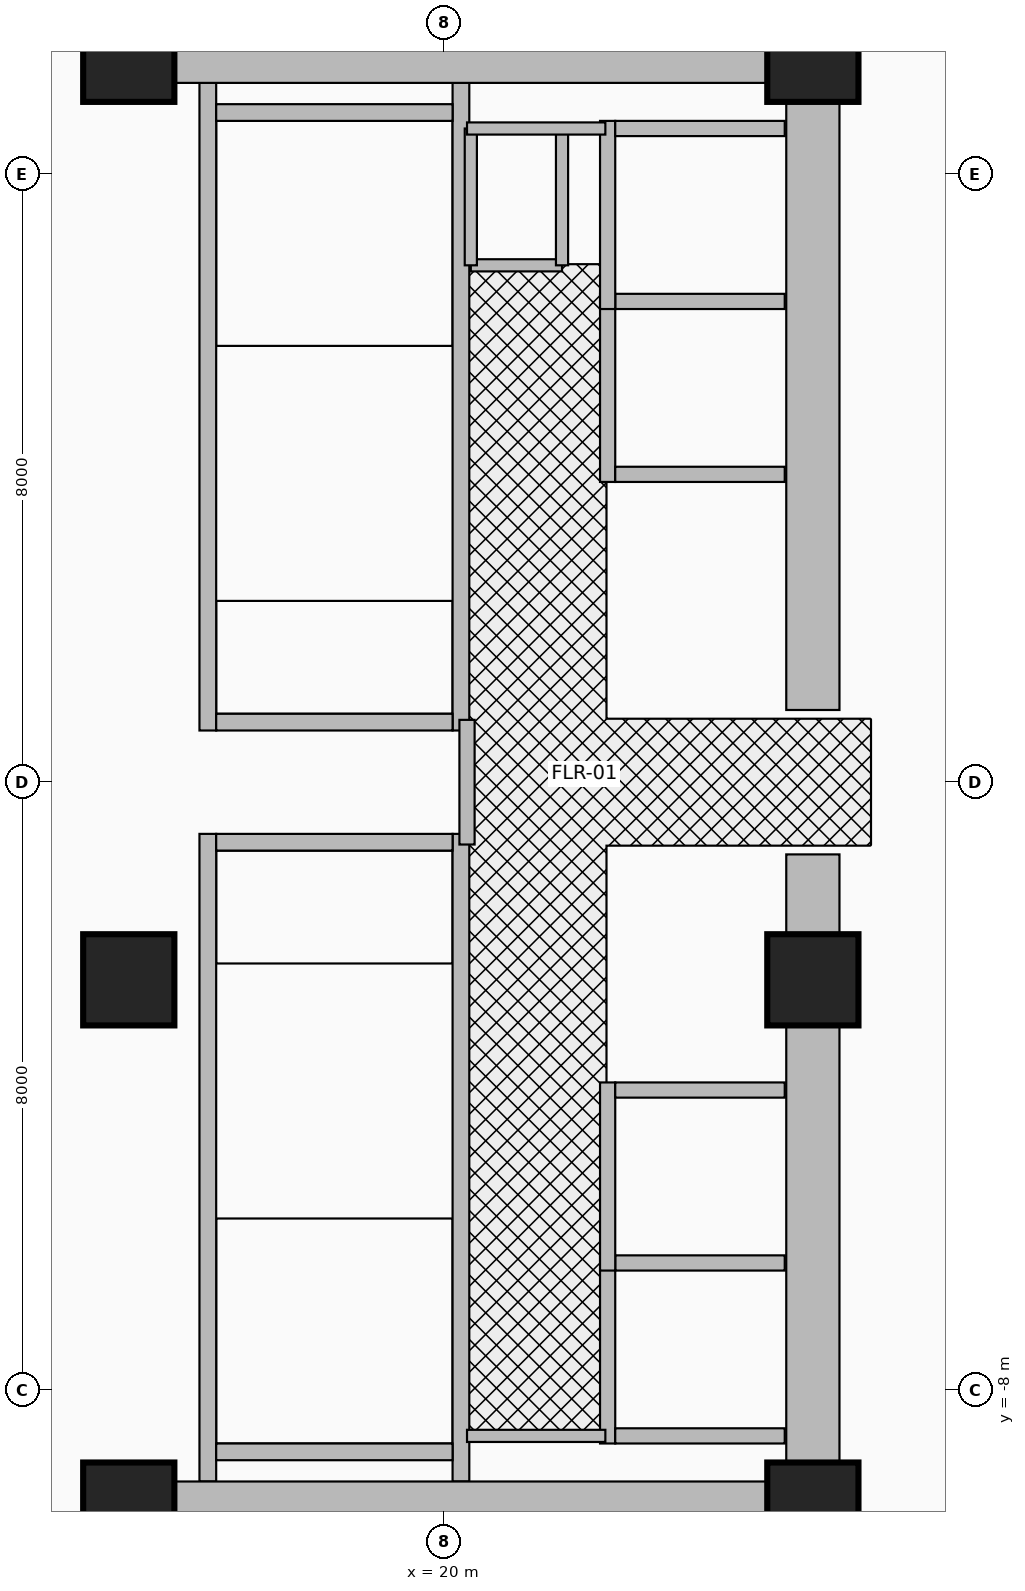
"""IFC4 building model, lengths in metres.
Left out: names, types, materials, properties, quantities, classifications, styles, units other than length and angle.
Written with IfcOpenShell. Run it as: python <this file> out.ifc"""

import sys

from ifc_helpers import new_model, si_unit, direction, frame, frame_2d, origin, origin_2d, place, context, subcontext, project, spatial, rectangle, extrude, source, transform, mapped, element, fill, save


model = new_model("IFC4")
c1 = context("Model", 3, precision=1e-05, world=origin(), true_north=direction((0.0, 1.0)))
c2 = subcontext(c1, "Body", "Model", "MODEL_VIEW")
j1 = project(units=[si_unit("LENGTHUNIT", "METRE"), si_unit("PLANEANGLEUNIT", "RADIAN")], contexts=[c1])
p1 = place(None, origin())
s1 = spatial("IfcSite", under=j1, at=p1, CompositionType="ELEMENT")
p2 = place(p1, origin())
s2 = spatial("IfcBuilding", under=s1, at=p2, CompositionType="ELEMENT")
p3 = place(p2, frame((0.0, 0.0, 101.1)))
s3 = spatial("IfcBuildingStorey", under=s2, at=p3, CompositionType="ELEMENT", Elevation=101.1)
for number, where, z_axis, x_axis in (
    (1, (16.89, 0.68, 0.0), (0.0, 0.0, 1.0), (0.0, 1.0, 0.0)),
    (2, (20.22, 0.68, 0.0), (0.0, 0.0, 1.0), (0.0, 1.0, 0.0)),
):
    element("IfcWall", number, at=place(p3, frame(where, z_axis=z_axis, x_axis=x_axis)), inside=s3, PredefinedType="SHEAR", context=c2, shape_type="SweptSolid", body=[
        extrude(rectangle(XDim=8.52, YDim=0.22, at=frame_2d((4.26, 0.0))), origin(), (0.0, 0.0, 1.0), 4.36),
    ])
p4 = place(p3, frame((17.0, 0.79, 0.0), z_axis=(0.0, 0.0, 1.0), x_axis=(1.0, 0.0, 0.0)))
e3 = element("IfcWall", 3, at=p4, inside=s3, PredefinedType="SHEAR", context=c2, shape_type="SweptSolid", body=[
    extrude(rectangle(XDim=3.11, YDim=0.22, at=frame_2d((1.555, 0.0))), origin(), (0.0, 0.0, 1.0), 4.36),
])
p5 = place(p4, frame((0.95, 0.0, 0.0)))
e4 = element("IfcOpeningElement", 4, at=p5, cuts=e3, PredefinedType="OPENING", context=c2, shape_type="SweptSolid", body=[
    extrude(rectangle(XDim=1.1, YDim=2.15, at=frame_2d((0.55, 1.075))), frame((0.0, 0.125, 0.0), z_axis=(0.0, -1.0, 0.0), x_axis=(1.0, 0.0, 0.0)), (0.0, 0.0, 1.0), 0.25),
])
p6 = place(p3, frame((17.0, 8.81, 0.0), z_axis=(0.0, 0.0, 1.0), x_axis=(1.0, 0.0, 0.0)))
e5 = element("IfcWall", 5, at=p6, inside=s3, PredefinedType="SHEAR", context=c2, shape_type="SweptSolid", body=[
    extrude(rectangle(XDim=3.11, YDim=0.22, at=frame_2d((1.555, 0.0))), origin(), (0.0, 0.0, 1.0), 4.36),
])
for number, where, z_axis, x_axis in (
    (6, (16.89, -9.2, 0.0), (0.0, 0.0, 1.0), (0.0, 1.0, 0.0)),
    (7, (20.22, -9.2, 0.0), (0.0, 0.0, 1.0), (0.0, 1.0, 0.0)),
):
    element("IfcWall", number, at=place(p3, frame(where, z_axis=z_axis, x_axis=x_axis)), inside=s3, PredefinedType="SHEAR", context=c2, shape_type="SweptSolid", body=[
        extrude(rectangle(XDim=8.52, YDim=0.22, at=frame_2d((4.26, 0.0))), origin(), (0.0, 0.0, 1.0), 4.36),
    ])
p7 = place(p3, frame((17.0, -8.81, 0.0), z_axis=(0.0, 0.0, 1.0), x_axis=(1.0, 0.0, 0.0)))
e8 = element("IfcWall", 8, at=p7, inside=s3, PredefinedType="SHEAR", context=c2, shape_type="SweptSolid", body=[
    extrude(rectangle(XDim=3.11, YDim=0.22, at=frame_2d((1.555, 0.0))), origin(), (0.0, 0.0, 1.0), 4.36),
])
p8 = place(p3, frame((17.0, -0.79, 0.0), z_axis=(0.0, 0.0, 1.0), x_axis=(1.0, 0.0, 0.0)))
e9 = element("IfcWall", 9, at=p8, inside=s3, PredefinedType="SHEAR", context=c2, shape_type="SweptSolid", body=[
    extrude(rectangle(XDim=3.11, YDim=0.22, at=frame_2d((1.555, 0.0))), origin(), (0.0, 0.0, 1.0), 4.36),
])
p9 = place(p8, frame((0.95, 0.0, 0.0)))
e10 = element("IfcOpeningElement", 10, at=p9, cuts=e9, PredefinedType="OPENING", context=c2, shape_type="SweptSolid", body=[
    extrude(rectangle(XDim=1.1, YDim=2.15, at=frame_2d((0.55, 1.075))), frame((0.0, 0.125, 0.0), z_axis=(0.0, -1.0, 0.0), x_axis=(1.0, 0.0, 0.0)), (0.0, 0.0, 1.0), 0.25),
])
for number, where, z_axis, x_axis in (
    (11, (24.85, -9.9, 0.0), (0.0, 0.0, 1.0), (0.0, 1.0, 0.0)),
    (12, (24.85, 0.95, 0.0), (0.0, 0.0, 1.0), (0.0, 1.0, 0.0)),
):
    element("IfcWall", number, at=place(p3, frame(where, z_axis=z_axis, x_axis=x_axis)), inside=s3, PredefinedType="SHEAR", context=c2, shape_type="SweptSolid", body=[
        extrude(rectangle(XDim=8.95, YDim=0.7, at=frame_2d((4.475, 0.0))), origin(), (0.0, 0.0, 1.0), 4.36),
    ])
for number, where, z_axis, x_axis in (
    (13, (15.85, 9.55, 0.0), (0.0, 0.0, 1.0), (1.0, 0.0, 0.0)),
    (14, (15.85, -9.55, 0.0), (0.0, 0.0, 1.0), (1.0, 0.0, 0.0)),
):
    element("IfcWall", number, at=place(p3, frame(where, z_axis=z_axis, x_axis=x_axis)), inside=s3, PredefinedType="SHEAR", context=c2, shape_type="SweptSolid", body=[
        extrude(rectangle(XDim=9.0, YDim=0.7, at=frame_2d((4.5, 0.0))), origin(), (0.0, 0.0, 1.0), 4.36),
    ])
m1 = source(origin(), c2, "Body", "SweptSolid", [
    extrude(rectangle(XDim=1.2, YDim=1.2, at=origin_2d()), origin(), (0.0, 0.0, 1.0), 4.6),
])
for number, where, z_axis, x_axis in (
    (15, (15.85, -9.55, 0.0), (0.0, 0.0, 1.0), (1.0, 0.0, 0.0)),
    (16, (24.85, -9.55, 0.0), (0.0, 0.0, 1.0), (1.0, 0.0, 0.0)),
    (17, (15.85, -2.6, 0.0), (0.0, 0.0, 1.0), (1.0, 0.0, 0.0)),
    (18, (24.85, -2.6, 0.0), (0.0, 0.0, 1.0), (1.0, 0.0, 0.0)),
    (19, (15.85, 9.55, 0.0), (0.0, 0.0, 1.0), (1.0, 0.0, 0.0)),
    (20, (24.85, 9.55, 0.0), (0.0, 0.0, 1.0), (1.0, 0.0, 0.0)),
):
    element("IfcColumn", number, at=place(p3, frame(where, z_axis=z_axis, x_axis=x_axis)), inside=s3, PredefinedType="COLUMN", context=c2, shape_type="MappedRepresentation", body=[
        mapped(m1, transform((0.0, 0.0, 0.0), x_axis=(1.0, 0.0, 0.0), y_axis=(0.0, 1.0, 0.0), z_axis=(0.0, 0.0, 1.0), scale=1.0)),
    ])
p10 = place(p3, frame((22.15, -8.7, 0.0), z_axis=(0.0, 0.0, 1.0), x_axis=(0.0, 1.0, 0.0)))
e21 = element("IfcWall", 21, at=p10, inside=s3, PredefinedType="MOVABLE", context=c2, shape_type="SweptSolid", body=[
    extrude(rectangle(XDim=2.475, YDim=0.2, at=frame_2d((1.237, 0.0))), origin(), (0.0, 0.0, 1.0), 4.36),
])
p11 = place(p10, frame((0.688, 0.0, 0.0)))
e22 = element("IfcOpeningElement", 22, at=p11, cuts=e21, PredefinedType="OPENING", context=c2, shape_type="SweptSolid", body=[
    extrude(rectangle(XDim=1.1, YDim=2.1, at=frame_2d((0.55, 1.05))), frame((0.0, 0.115, 0.0), z_axis=(0.0, -1.0, 0.0), x_axis=(1.0, 0.0, 0.0)), (0.0, 0.0, 1.0), 0.23),
])
for number, where, z_axis, x_axis in (
    (23, (22.25, -8.6, 0.0), (0.0, 0.0, 1.0), (1.0, 0.0, 0.0)),
    (24, (22.25, -6.325, 0.0), (0.0, 0.0, 1.0), (1.0, 0.0, 0.0)),
):
    element("IfcWall", number, at=place(p3, frame(where, z_axis=z_axis, x_axis=x_axis)), inside=s3, PredefinedType="MOVABLE", context=c2, shape_type="SweptSolid", body=[
        extrude(rectangle(XDim=2.23, YDim=0.2, at=frame_2d((1.115, 0.0))), origin(), (0.0, 0.0, 1.0), 4.36),
    ])
p12 = place(p3, frame((22.15, -6.425, 0.0), z_axis=(0.0, 0.0, 1.0), x_axis=(0.0, 1.0, 0.0)))
e25 = element("IfcWall", 25, at=p12, inside=s3, PredefinedType="MOVABLE", context=c2, shape_type="SweptSolid", body=[
    extrude(rectangle(XDim=2.475, YDim=0.2, at=frame_2d((1.238, 0.0))), origin(), (0.0, 0.0, 1.0), 4.36),
])
p13 = place(p12, frame((0.688, 0.0, 0.0)))
e26 = element("IfcOpeningElement", 26, at=p13, cuts=e25, PredefinedType="OPENING", context=c2, shape_type="SweptSolid", body=[
    extrude(rectangle(XDim=1.1, YDim=2.1, at=frame_2d((0.55, 1.05))), frame((0.0, 0.115, 0.0), z_axis=(0.0, -1.0, 0.0), x_axis=(1.0, 0.0, 0.0)), (0.0, 0.0, 1.0), 0.23),
])
p14 = place(p3, frame((22.25, -4.05, 0.0), z_axis=(0.0, 0.0, 1.0), x_axis=(1.0, 0.0, 0.0)))
e27 = element("IfcWall", 27, at=p14, inside=s3, PredefinedType="MOVABLE", context=c2, shape_type="SweptSolid", body=[
    extrude(rectangle(XDim=2.23, YDim=0.2, at=frame_2d((1.115, 0.0))), origin(), (0.0, 0.0, 1.0), 4.36),
])
p15 = place(p3, frame((22.15, 3.95, 0.0), z_axis=(0.0, 0.0, 1.0), x_axis=(0.0, 1.0, 0.0)))
e28 = element("IfcWall", 28, at=p15, inside=s3, PredefinedType="MOVABLE", context=c2, shape_type="SweptSolid", body=[
    extrude(rectangle(XDim=2.475, YDim=0.2, at=frame_2d((1.238, 0.0))), origin(), (0.0, 0.0, 1.0), 4.36),
])
p16 = place(p15, frame((0.688, 0.0, 0.0)))
e29 = element("IfcOpeningElement", 29, at=p16, cuts=e28, PredefinedType="OPENING", context=c2, shape_type="SweptSolid", body=[
    extrude(rectangle(XDim=1.1, YDim=2.1, at=frame_2d((0.55, 1.05))), frame((0.0, 0.115, 0.0), z_axis=(0.0, -1.0, 0.0), x_axis=(1.0, 0.0, 0.0)), (0.0, 0.0, 1.0), 0.23),
])
for number, where, z_axis, x_axis in (
    (30, (22.25, 4.05, 0.0), (0.0, 0.0, 1.0), (1.0, 0.0, 0.0)),
    (31, (22.25, 6.325, 0.0), (0.0, 0.0, 1.0), (1.0, 0.0, 0.0)),
):
    element("IfcWall", number, at=place(p3, frame(where, z_axis=z_axis, x_axis=x_axis)), inside=s3, PredefinedType="MOVABLE", context=c2, shape_type="SweptSolid", body=[
        extrude(rectangle(XDim=2.23, YDim=0.2, at=frame_2d((1.115, 0.0))), origin(), (0.0, 0.0, 1.0), 3.145),
    ])
p17 = place(p3, frame((22.15, 6.225, 0.0), z_axis=(0.0, 0.0, 1.0), x_axis=(0.0, 1.0, 0.0)))
e32 = element("IfcWall", 32, at=p17, inside=s3, PredefinedType="MOVABLE", context=c2, shape_type="SweptSolid", body=[
    extrude(rectangle(XDim=2.475, YDim=0.2, at=frame_2d((1.237, 0.0))), origin(), (0.0, 0.0, 1.0), 4.36),
])
p18 = place(p17, frame((0.688, 0.0, 0.0)))
e33 = element("IfcOpeningElement", 33, at=p18, cuts=e32, PredefinedType="OPENING", context=c2, shape_type="SweptSolid", body=[
    extrude(rectangle(XDim=1.1, YDim=2.1, at=frame_2d((0.55, 1.05))), frame((0.0, 0.115, 0.0), z_axis=(0.0, -1.0, 0.0), x_axis=(1.0, 0.0, 0.0)), (0.0, 0.0, 1.0), 0.23),
])
p19 = place(p3, frame((22.25, 8.6, 0.0), z_axis=(0.0, 0.0, 1.0), x_axis=(1.0, 0.0, 0.0)))
e34 = element("IfcWall", 34, at=p19, inside=s3, PredefinedType="MOVABLE", context=c2, shape_type="SweptSolid", body=[
    extrude(rectangle(XDim=2.23, YDim=0.2, at=frame_2d((1.115, 0.0))), origin(), (0.0, 0.0, 1.0), 3.145),
])
p20 = place(p3, frame((20.3, -0.82, 0.0), z_axis=(0.0, 0.0, 1.0), x_axis=(0.0, 1.0, 0.0)))
e35 = element("IfcWall", 35, at=p20, inside=s3, PredefinedType="PARTITIONING", context=c2, shape_type="SweptSolid", body=[
    extrude(rectangle(XDim=1.64, YDim=0.2, at=frame_2d((0.82, 0.0))), origin(), (0.0, 0.0, 1.0), 4.36),
])
p21 = place(p20, frame((0.295, 0.0, 0.0)))
e36 = element("IfcOpeningElement", 36, at=p21, cuts=e35, PredefinedType="OPENING", context=c2, shape_type="SweptSolid", body=[
    extrude(rectangle(XDim=1.05, YDim=2.15, at=frame_2d((0.525, 1.075))), frame((0.0, 0.115, 0.0), z_axis=(0.0, -1.0, 0.0), x_axis=(1.0, 0.0, 0.0)), (0.0, 0.0, 1.0), 0.23),
])
p22 = place(p3, frame((20.35, 6.8, 0.0), z_axis=(0.0, 0.0, 1.0), x_axis=(1.0, 0.0, 0.0)))
e37 = element("IfcWall", 37, at=p22, inside=s3, PredefinedType="PARTITIONING", context=c2, shape_type="SweptSolid", body=[
    extrude(rectangle(XDim=1.2, YDim=0.16, at=frame_2d((0.6, 0.0))), origin(), (0.0, 0.0, 1.0), 4.36),
])
p23 = place(p22, frame((0.175, 0.0, 0.0)))
e38 = element("IfcOpeningElement", 38, at=p23, cuts=e37, PredefinedType="OPENING", context=c2, shape_type="SweptSolid", body=[
    extrude(rectangle(XDim=0.85, YDim=2.05, at=frame_2d((0.425, 1.025))), frame((0.0, 0.095, 0.0), z_axis=(0.0, -1.0, 0.0), x_axis=(1.0, 0.0, 0.0)), (0.0, 0.0, 1.0), 0.19),
])
for number, where, z_axis, x_axis in (
    (39, (21.55, 6.8, 0.0), (0.0, 0.0, 1.0), (0.0, 1.0, 0.0)),
    (40, (20.35, 6.8, 0.0), (0.0, 0.0, 1.0), (0.0, 1.0, 0.0)),
):
    element("IfcWall", number, at=place(p3, frame(where, z_axis=z_axis, x_axis=x_axis)), inside=s3, PredefinedType="PARTITIONING", context=c2, shape_type="SweptSolid", body=[
        extrude(rectangle(XDim=1.8, YDim=0.16, at=frame_2d((0.9, 0.0))), origin(), (0.0, 0.0, 1.0), 4.36),
    ])
for number, where, z_axis, x_axis in (
    (41, (20.3, -8.6, 0.0), (0.0, 0.0, 1.0), (1.0, 0.0, 0.0)),
    (42, (20.3, 8.6, 0.0), (0.0, 0.0, 1.0), (1.0, 0.0, 0.0)),
):
    element("IfcWall", number, at=place(p3, frame(where, z_axis=z_axis, x_axis=x_axis)), inside=s3, PredefinedType="PARTITIONING", context=c2, shape_type="SweptSolid", body=[
        extrude(rectangle(XDim=1.82, YDim=0.16, at=frame_2d((0.91, 0.0))), origin(), (0.0, 0.0, 1.0), 4.36),
    ])
p24 = place(p11, origin())
e43 = element("IfcDoor", 43, at=p24, inside=s3, OperationType="DOUBLE_DOOR_SLIDING", PredefinedType="DOOR", context=c2, shape_type="SweptSolid", body=[
    extrude(rectangle(XDim=1.1, YDim=2.1, at=frame_2d((0.55, 1.05))), frame((0.0, 0.025, 0.0), z_axis=(0.0, -1.0, 0.0), x_axis=(1.0, 0.0, 0.0)), (0.0, 0.0, 1.0), 0.05),
])
fill(e22, e43)
p25 = place(p13, origin())
e44 = element("IfcDoor", 44, at=p25, inside=s3, OperationType="DOUBLE_DOOR_SLIDING", PredefinedType="DOOR", context=c2, shape_type="SweptSolid", body=[
    extrude(rectangle(XDim=1.1, YDim=2.1, at=frame_2d((0.55, 1.05))), frame((0.0, 0.025, 0.0), z_axis=(0.0, -1.0, 0.0), x_axis=(1.0, 0.0, 0.0)), (0.0, 0.0, 1.0), 0.05),
])
fill(e26, e44)
p26 = place(p16, origin())
e45 = element("IfcDoor", 45, at=p26, inside=s3, OperationType="DOUBLE_DOOR_SLIDING", PredefinedType="DOOR", context=c2, shape_type="SweptSolid", body=[
    extrude(rectangle(XDim=1.1, YDim=2.1, at=frame_2d((0.55, 1.05))), frame((0.0, 0.025, 0.0), z_axis=(0.0, -1.0, 0.0), x_axis=(1.0, 0.0, 0.0)), (0.0, 0.0, 1.0), 0.05),
])
fill(e29, e45)
p27 = place(p18, origin())
e46 = element("IfcDoor", 46, at=p27, inside=s3, OperationType="DOUBLE_DOOR_SLIDING", PredefinedType="DOOR", context=c2, shape_type="SweptSolid", body=[
    extrude(rectangle(XDim=1.1, YDim=2.1, at=frame_2d((0.55, 1.05))), frame((0.0, 0.025, 0.0), z_axis=(0.0, -1.0, 0.0), x_axis=(1.0, 0.0, 0.0)), (0.0, 0.0, 1.0), 0.05),
])
fill(e33, e46)
p28 = place(p21, origin())
e47 = element("IfcDoor", 47, at=p28, inside=s3, OperationType="SINGLE_SWING_RIGHT", PredefinedType="DOOR", context=c2, shape_type="SweptSolid", body=[
    extrude(rectangle(XDim=1.05, YDim=2.15, at=frame_2d((0.525, 1.075))), frame((0.0, 0.025, 0.0), z_axis=(0.0, -1.0, 0.0), x_axis=(1.0, 0.0, 0.0)), (0.0, 0.0, 1.0), 0.05),
])
fill(e36, e47)
p29 = place(p5, frame((1.1, 0.0, 0.0), z_axis=(0.0, 0.0, 1.0), x_axis=(-1.0, 0.0, 0.0)))
e48 = element("IfcDoor", 48, at=p29, inside=s3, OperationType="SINGLE_SWING_LEFT", PredefinedType="DOOR", context=c2, shape_type="SweptSolid", body=[
    extrude(rectangle(XDim=1.1, YDim=2.15, at=frame_2d((0.55, 1.075))), frame((0.0, 0.025, 0.0), z_axis=(0.0, -1.0, 0.0), x_axis=(1.0, 0.0, 0.0)), (0.0, 0.0, 1.0), 0.05),
])
fill(e4, e48)
p30 = place(p9, origin())
e49 = element("IfcDoor", 49, at=p30, inside=s3, OperationType="SINGLE_SWING_RIGHT", PredefinedType="DOOR", context=c2, shape_type="SweptSolid", body=[
    extrude(rectangle(XDim=1.1, YDim=2.15, at=frame_2d((0.55, 1.075))), frame((0.0, 0.025, 0.0), z_axis=(0.0, -1.0, 0.0), x_axis=(1.0, 0.0, 0.0)), (0.0, 0.0, 1.0), 0.05),
])
fill(e10, e49)
p31 = place(p23, origin())
e50 = element("IfcDoor", 50, at=p31, inside=s3, OperationType="SINGLE_SWING_LEFT", PredefinedType="DOOR", context=c2, shape_type="SweptSolid", body=[
    extrude(rectangle(XDim=0.85, YDim=2.05, at=frame_2d((0.425, 1.025))), frame((0.0, 0.025, 0.0), z_axis=(0.0, -1.0, 0.0), x_axis=(1.0, 0.0, 0.0)), (0.0, 0.0, 1.0), 0.05),
])
fill(e38, e50)
save(model, sys.argv[1])
